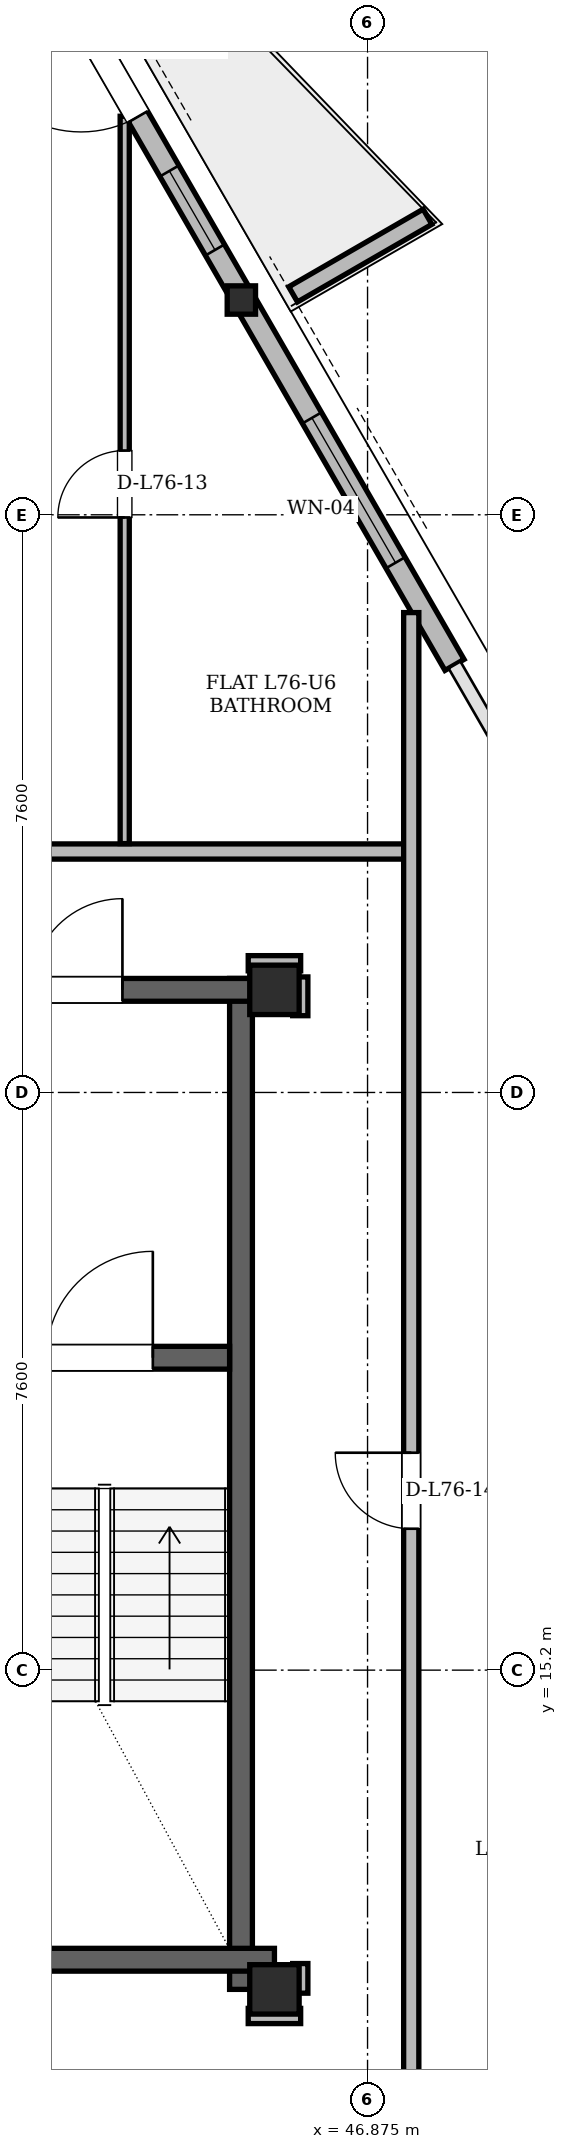
"""IFC4 building model, lengths in metres.
Left out: names, types, materials, properties, quantities, classifications, styles, units other than length and angle.
Written with IfcOpenShell. Run it as: python <this file> out.ifc"""

import sys

from ifc_helpers import new_model, si_unit, direction, frame, frame_2d, origin, origin_2d, place, context, subcontext, project, spatial, polyline, rectangle, hollow_rectangle, i_section, outline, extrude, element, fill, save


model = new_model("IFC4")
c1 = context("Model", 3, precision=1e-05, world=origin(), true_north=direction((0.0, 1.0)))
c2 = subcontext(c1, "Body", "Model", "MODEL_VIEW")
j1 = project(units=[si_unit("LENGTHUNIT", "METRE"), si_unit("PLANEANGLEUNIT", "RADIAN")], contexts=[c1])
p1 = place(None, origin())
s1 = spatial("IfcSite", under=j1, at=p1, CompositionType="ELEMENT")
p2 = place(p1, origin())
s2 = spatial("IfcBuilding", under=s1, at=p2, CompositionType="ELEMENT")
p3 = place(p2, frame((0.0, 0.0, 288.9)))
s3 = spatial("IfcBuildingStorey", under=s2, at=p3, CompositionType="ELEMENT", Elevation=288.9)
for number, where, z_axis, x_axis in (
    (1, (45.65, 11.0, 0.0), (0.0, 0.0, 1.0), (1.0, 0.0, 0.0)),
    (2, (45.65, 24.15, 0.0), (0.0, 0.0, 1.0), (1.0, 0.0, 0.0)),
):
    element("IfcColumn", number, at=place(p3, frame(where, z_axis=z_axis, x_axis=x_axis)), inside=s3, PredefinedType="COLUMN", context=c2, shape_type="SweptSolid", body=[
        extrude(hollow_rectangle(XDim=0.65, YDim=0.65, WallThickness=0.05, at=origin_2d()), origin(), (0.0, 0.0, 1.0), 3.9),
    ])
p4 = place(p3, frame((45.242, 33.236, 0.005), z_axis=(-0.013865566769, -0.005395650417, 0.999889310381), x_axis=(0.36264974698, -0.931925512589, 0.0)))
e3 = element("IfcColumn", 3, at=p4, inside=s3, PredefinedType="COLUMN", context=c2, shape_type="SweptSolid", body=[
    extrude(i_section(OverallWidth=0.373, OverallDepth=0.373, WebThickness=0.016, FlangeThickness=0.026, at=origin_2d()), origin(), (0.0, 0.0, 1.0), 3.891),
])
p5 = place(p3, frame((45.21, 11.0, 0.0), z_axis=(0.0, 0.0, 1.0), x_axis=(0.0, 1.0, 0.0)))
e4 = element("IfcWall", 4, at=p5, inside=s3, PredefinedType="SHEAR", context=c2, shape_type="SweptSolid", body=[
    extrude(rectangle(XDim=13.3, YDim=0.3, at=frame_2d((6.65, 0.0))), origin(), (0.0, 0.0, 1.0), 3.68),
])
p6 = place(p3, frame((38.55, 11.39, 0.0), z_axis=(0.0, 0.0, 1.0), x_axis=(1.0, 0.0, 0.0)))
e5 = element("IfcWall", 5, at=p6, inside=s3, PredefinedType="SHEAR", context=c2, shape_type="SweptSolid", body=[
    extrude(rectangle(XDim=7.1, YDim=0.3, at=frame_2d((3.55, 0.0))), origin(), (0.0, 0.0, 1.0), 3.68),
])
p7 = place(p3, frame((29.65, 24.15, 0.0), z_axis=(0.0, 0.0, 1.0), x_axis=(1.0, 0.0, 0.0)))
e6 = element("IfcWall", 6, at=p7, inside=s3, PredefinedType="SHEAR", context=c2, shape_type="SweptSolid", body=[
    extrude(rectangle(XDim=15.7, YDim=0.3, at=frame_2d((7.85, 0.0))), origin(), (0.0, 0.0, 1.0), 3.68),
])
p8 = place(p7, frame((1.7, 0.0, 0.0)))
e7 = element("IfcOpeningElement", 7, at=p8, cuts=e6, PredefinedType="OPENING", context=c2, shape_type="SweptSolid", body=[
    extrude(rectangle(XDim=1.2, YDim=2.2, at=frame_2d((0.6, 1.1))), frame((0.0, 0.15, 0.0), z_axis=(0.0, -1.0, 0.0), x_axis=(1.0, 0.0, 0.0)), (0.0, 0.0, 1.0), 0.3),
])
p9 = place(p7, frame((12.8, 0.0, 0.0)))
e8 = element("IfcOpeningElement", 8, at=p9, cuts=e6, PredefinedType="OPENING", context=c2, shape_type="SweptSolid", body=[
    extrude(rectangle(XDim=1.2, YDim=2.2, at=frame_2d((0.6, 1.1))), frame((0.0, 0.15, 0.0), z_axis=(0.0, -1.0, 0.0), x_axis=(1.0, 0.0, 0.0)), (0.0, 0.0, 1.0), 0.3),
])
p10 = place(p7, frame((6.55, 0.0, 0.0)))
e9 = element("IfcOpeningElement", 9, at=p10, cuts=e6, PredefinedType="OPENING", context=c2, shape_type="SweptSolid", body=[
    extrude(rectangle(XDim=0.9, YDim=2.05, at=frame_2d((0.45, 1.025))), frame((0.0, 0.15, 0.0), z_axis=(0.0, -1.0, 0.0), x_axis=(1.0, 0.0, 0.0)), (0.0, 0.0, 1.0), 0.3),
])
p11 = place(p7, frame((8.45, 0.0, 0.0)))
e10 = element("IfcOpeningElement", 10, at=p11, cuts=e6, PredefinedType="OPENING", context=c2, shape_type="SweptSolid", body=[
    extrude(rectangle(XDim=0.9, YDim=2.05, at=frame_2d((0.45, 1.025))), frame((0.0, 0.15, 0.0), z_axis=(0.0, -1.0, 0.0), x_axis=(1.0, 0.0, 0.0)), (0.0, 0.0, 1.0), 0.3),
])
p12 = place(p3, frame((41.05, 19.31, 0.0), z_axis=(0.0, 0.0, 1.0), x_axis=(1.0, 0.0, 0.0)))
e11 = element("IfcWall", 11, at=p12, inside=s3, PredefinedType="SHEAR", context=c2, shape_type="SweptSolid", body=[
    extrude(rectangle(XDim=4.01, YDim=0.3, at=frame_2d((2.005, 0.0))), origin(), (0.0, 0.0, 1.0), 3.68),
])
p13 = place(p12, frame((1.6, 0.0, 0.0)))
e12 = element("IfcOpeningElement", 12, at=p13, cuts=e11, PredefinedType="OPENING", context=c2, shape_type="SweptSolid", body=[
    extrude(rectangle(XDim=1.4, YDim=2.2, at=frame_2d((0.7, 1.1))), frame((0.0, 0.15, 0.0), z_axis=(0.0, -1.0, 0.0), x_axis=(1.0, 0.0, 0.0)), (0.0, 0.0, 1.0), 0.3),
])
p14 = place(p3, frame((48.019, 28.425, 0.0), z_axis=(0.0, 0.0, 1.0), x_axis=(-0.49998725717, 0.866032760736, 0.0)))
e13 = element("IfcWall", 13, at=p14, inside=s3, PredefinedType="SOLIDWALL", context=c2, shape_type="SweptSolid", body=[
    extrude(rectangle(XDim=16.813, YDim=0.29, at=frame_2d((8.406, 0.0))), origin(), (0.0, 0.0, 1.0), 3.058),
])
p15 = place(p14, frame((8.328, 0.0, 0.0)))
e14 = element("IfcOpeningElement", 14, at=p15, cuts=e13, PredefinedType="OPENING", context=c2, shape_type="SweptSolid", body=[
    extrude(rectangle(XDim=1.5, YDim=2.2, at=frame_2d((0.75, 1.1))), frame((0.0, 0.145, 0.0), z_axis=(0.0, -1.0, 0.0), x_axis=(1.0, 0.0, 0.0)), (0.0, 0.0, 1.0), 0.29),
])
p16 = place(p14, frame((6.303, 0.0, 0.85)))
e15 = element("IfcOpeningElement", 15, at=p16, cuts=e13, PredefinedType="OPENING", context=c2, shape_type="SweptSolid", body=[
    extrude(rectangle(XDim=1.2, YDim=1.48, at=frame_2d((0.6, 0.74))), frame((0.0, 0.145, 0.0), z_axis=(0.0, -1.0, 0.0), x_axis=(1.0, 0.0, 0.0)), (0.0, 0.0, 1.0), 0.29),
])
p17 = place(p14, frame((12.846, 0.0, 0.85)))
e16 = element("IfcOpeningElement", 16, at=p17, cuts=e13, PredefinedType="OPENING", context=c2, shape_type="SweptSolid", body=[
    extrude(rectangle(XDim=1.8, YDim=1.75, at=frame_2d((0.9, 0.875))), frame((0.0, 0.145, 0.0), z_axis=(0.0, -1.0, 0.0), x_axis=(1.0, 0.0, 0.0)), (0.0, 0.0, 1.0), 0.29),
])
p18 = place(p14, frame((1.552, 0.0, 0.85)))
e17 = element("IfcOpeningElement", 17, at=p18, cuts=e13, PredefinedType="OPENING", context=c2, shape_type="SweptSolid", body=[
    extrude(rectangle(XDim=2.2, YDim=1.85, at=frame_2d((1.1, 0.925))), frame((0.0, 0.145, 0.0), z_axis=(0.0, -1.0, 0.0), x_axis=(1.0, 0.0, 0.0)), (0.0, 0.0, 1.0), 0.29),
])
p19 = place(p3, frame((45.896, 33.3, 0.0), z_axis=(0.0, 0.0, 1.0), x_axis=(0.866042246008, 0.499970827278, 0.0)))
e18 = element("IfcWall", 18, at=p19, inside=s3, PredefinedType="PARAPET", context=c2, shape_type="SweptSolid", body=[
    extrude(outline(polyline([(0.0, 0.0), (2.042, 0.0), (2.042, 1.1), (0.0, 1.32), (0.0, 0.0)])), frame((0.0, 0.115, 0.0), z_axis=(0.0, -1.0, 0.0), x_axis=(1.0, 0.0, 0.0)), (0.0, 0.0, 1.0), 0.23),
])
p20 = place(p3, frame((45.305, 10.65, 0.0), z_axis=(0.0, 0.0, 1.0), x_axis=(1.0, 0.0, 0.0)))
e19 = element("IfcWall", 19, at=p20, inside=s3, PredefinedType="PARTITIONING", context=c2, shape_type="SweptSolid", body=[
    extrude(rectangle(XDim=0.69, YDim=0.2, at=frame_2d((0.345, 0.0))), origin(), (0.0, 0.0, 1.0), 3.68),
])
p21 = place(p3, frame((45.305, 24.5, 0.0), z_axis=(0.0, 0.0, 1.0), x_axis=(1.0, 0.0, 0.0)))
e20 = element("IfcWall", 20, at=p21, inside=s3, PredefinedType="PARTITIONING", context=c2, shape_type="SweptSolid", body=[
    extrude(rectangle(XDim=0.69, YDim=0.2, at=frame_2d((0.345, 0.0))), origin(), (0.0, 0.0, 1.0), 3.266),
])
p22 = place(p3, frame((25.735, 25.97, 0.0), z_axis=(0.0, 0.0, 1.0), x_axis=(1.0, 0.0, 0.0)))
e21 = element("IfcWall", 21, at=p22, inside=s3, PredefinedType="PARTITIONING", context=c2, shape_type="SweptSolid", body=[
    extrude(rectangle(XDim=21.715, YDim=0.2, at=frame_2d((10.857, 0.0))), origin(), (0.0, 0.0, 1.0), 3.266),
])
p23 = place(p22, frame((3.675, 0.0, 0.0)))
e22 = element("IfcOpeningElement", 22, at=p23, cuts=e21, PredefinedType="OPENING", context=c2, shape_type="SweptSolid", body=[
    extrude(rectangle(XDim=1.0, YDim=2.18, at=frame_2d((0.5, 1.09))), frame((0.0, 0.1, 0.0), z_axis=(0.0, -1.0, 0.0), x_axis=(1.0, 0.0, 0.0)), (0.0, 0.0, 1.0), 0.2),
])
p24 = place(p22, frame((9.615, 0.0, 0.0)))
e23 = element("IfcOpeningElement", 23, at=p24, cuts=e21, PredefinedType="OPENING", context=c2, shape_type="SweptSolid", body=[
    extrude(rectangle(XDim=1.3, YDim=2.2, at=frame_2d((0.65, 1.1))), frame((0.0, 0.1, 0.0), z_axis=(0.0, -1.0, 0.0), x_axis=(1.0, 0.0, 0.0)), (0.0, 0.0, 1.0), 0.2),
])
p25 = place(p22, frame((14.807, 0.0, 0.0)))
e24 = element("IfcOpeningElement", 24, at=p25, cuts=e21, PredefinedType="OPENING", context=c2, shape_type="SweptSolid", body=[
    extrude(rectangle(XDim=1.0, YDim=2.18, at=frame_2d((0.5, 1.09))), frame((0.0, 0.1, 0.0), z_axis=(0.0, -1.0, 0.0), x_axis=(1.0, 0.0, 0.0)), (0.0, 0.0, 1.0), 0.2),
])
p26 = place(p3, frame((43.68, 26.074, 0.0), z_axis=(0.0, 0.0, 1.0), x_axis=(0.0, 1.0, 0.0)))
e25 = element("IfcWall", 25, at=p26, inside=s3, PredefinedType="PARTITIONING", context=c2, shape_type="SweptSolid", body=[
    extrude(rectangle(XDim=9.569, YDim=0.12, at=frame_2d((4.785, 0.0))), origin(), (0.0, 0.0, 1.0), 3.266),
])
p27 = place(p26, frame((4.291, 0.0, 0.0)))
e26 = element("IfcOpeningElement", 26, at=p27, cuts=e25, PredefinedType="OPENING", context=c2, shape_type="SweptSolid", body=[
    extrude(rectangle(XDim=0.88, YDim=2.08, at=frame_2d((0.44, 1.04))), frame((0.0, 0.06, 0.0), z_axis=(0.0, -1.0, 0.0), x_axis=(1.0, 0.0, 0.0)), (0.0, 0.0, 1.0), 0.12),
])
p28 = place(p3, frame((45.99, 10.95, 0.0), z_axis=(0.0, 0.0, 1.0), x_axis=(0.0, 1.0, 0.0)))
e27 = element("IfcWall", 27, at=p28, inside=s3, PredefinedType="PARTITIONING", context=c2, shape_type="SweptSolid", body=[
    extrude(rectangle(XDim=0.39, YDim=0.2, at=frame_2d((0.195, 0.0))), origin(), (0.0, 0.0, 1.0), 3.68),
])
p29 = place(p3, frame((45.99, 23.81, 0.0), z_axis=(0.0, 0.0, 1.0), x_axis=(0.0, 1.0, 0.0)))
e28 = element("IfcWall", 28, at=p29, inside=s3, PredefinedType="PARTITIONING", context=c2, shape_type="SweptSolid", body=[
    extrude(rectangle(XDim=0.51, YDim=0.2, at=frame_2d((0.255, 0.0))), origin(), (0.0, 0.0, 1.0), 3.68),
])
p30 = place(p3, frame((47.45, 6.976, 0.0), z_axis=(0.0, 0.0, 1.0), x_axis=(0.0, 1.0, 0.0)))
e29 = element("IfcWall", 29, at=p30, inside=s3, PredefinedType="PARTITIONING", context=c2, shape_type="SweptSolid", body=[
    extrude(rectangle(XDim=22.137, YDim=0.2, at=frame_2d((11.068, 0.0))), origin(), (0.0, 0.0, 1.0), 3.058),
])
p31 = place(p30, frame((10.084, 0.0, 0.0)))
e30 = element("IfcOpeningElement", 30, at=p31, cuts=e29, PredefinedType="OPENING", context=c2, shape_type="SweptSolid", body=[
    extrude(rectangle(XDim=1.0, YDim=2.18, at=frame_2d((0.5, 1.09))), frame((0.0, 0.1, 0.0), z_axis=(0.0, -1.0, 0.0), x_axis=(1.0, 0.0, 0.0)), (0.0, 0.0, 1.0), 0.2),
])
p32 = place(p15, origin())
e31 = element("IfcDoor", 31, at=p32, inside=s3, OperationType="SINGLE_SWING_RIGHT", PredefinedType="DOOR", context=c2, shape_type="SweptSolid", body=[
    extrude(rectangle(XDim=1.5, YDim=2.2, at=frame_2d((0.75, 1.1))), frame((0.0, 0.025, 0.0), z_axis=(0.0, -1.0, 0.0), x_axis=(1.0, 0.0, 0.0)), (0.0, 0.0, 1.0), 0.05),
])
fill(e14, e31)
p33 = place(p16, origin())
e32 = element("IfcWindow", 32, at=p33, inside=s3, PartitioningType="SINGLE_PANEL", PredefinedType="WINDOW", context=c2, shape_type="SweptSolid", body=[
    extrude(rectangle(XDim=1.2, YDim=1.48, at=frame_2d((0.6, 0.74))), frame((0.0, 0.03, 0.0), z_axis=(0.0, -1.0, 0.0), x_axis=(1.0, 0.0, 0.0)), (0.0, 0.0, 1.0), 0.06),
])
fill(e15, e32)
p34 = place(p18, origin())
e33 = element("IfcWindow", 33, at=p34, inside=s3, PartitioningType="SINGLE_PANEL", PredefinedType="WINDOW", context=c2, shape_type="SweptSolid", body=[
    extrude(rectangle(XDim=2.2, YDim=1.85, at=frame_2d((1.1, 0.925))), frame((0.0, 0.03, 0.0), z_axis=(0.0, -1.0, 0.0), x_axis=(1.0, 0.0, 0.0)), (0.0, 0.0, 1.0), 0.06),
])
fill(e17, e33)
p35 = place(p13, origin())
e34 = element("IfcDoor", 34, at=p35, inside=s3, OperationType="SINGLE_SWING_RIGHT", PredefinedType="DOOR", context=c2, shape_type="SweptSolid", body=[
    extrude(rectangle(XDim=1.4, YDim=2.2, at=frame_2d((0.7, 1.1))), frame((0.0, 0.025, 0.0), z_axis=(0.0, -1.0, 0.0), x_axis=(1.0, 0.0, 0.0)), (0.0, 0.0, 1.0), 0.05),
])
fill(e12, e34)
p36 = place(p9, origin())
e35 = element("IfcDoor", 35, at=p36, inside=s3, OperationType="SINGLE_SWING_RIGHT", PredefinedType="DOOR", context=c2, shape_type="SweptSolid", body=[
    extrude(rectangle(XDim=1.2, YDim=2.2, at=frame_2d((0.6, 1.1))), frame((0.0, 0.025, 0.0), z_axis=(0.0, -1.0, 0.0), x_axis=(1.0, 0.0, 0.0)), (0.0, 0.0, 1.0), 0.05),
])
fill(e8, e35)
p37 = place(p27, origin())
e36 = element("IfcDoor", 36, at=p37, inside=s3, OperationType="SINGLE_SWING_LEFT", PredefinedType="DOOR", context=c2, shape_type="SweptSolid", body=[
    extrude(rectangle(XDim=0.88, YDim=2.08, at=frame_2d((0.44, 1.04))), frame((0.0, 0.025, 0.0), z_axis=(0.0, -1.0, 0.0), x_axis=(1.0, 0.0, 0.0)), (0.0, 0.0, 1.0), 0.05),
])
fill(e26, e36)
p38 = place(p31, origin())
e37 = element("IfcDoor", 37, at=p38, inside=s3, OperationType="SINGLE_SWING_RIGHT", PredefinedType="DOOR", context=c2, shape_type="SweptSolid", body=[
    extrude(rectangle(XDim=1.0, YDim=2.18, at=frame_2d((0.5, 1.09))), frame((0.0, 0.025, 0.0), z_axis=(0.0, -1.0, 0.0), x_axis=(1.0, 0.0, 0.0)), (0.0, 0.0, 1.0), 0.05),
])
fill(e30, e37)
save(model, sys.argv[1])
